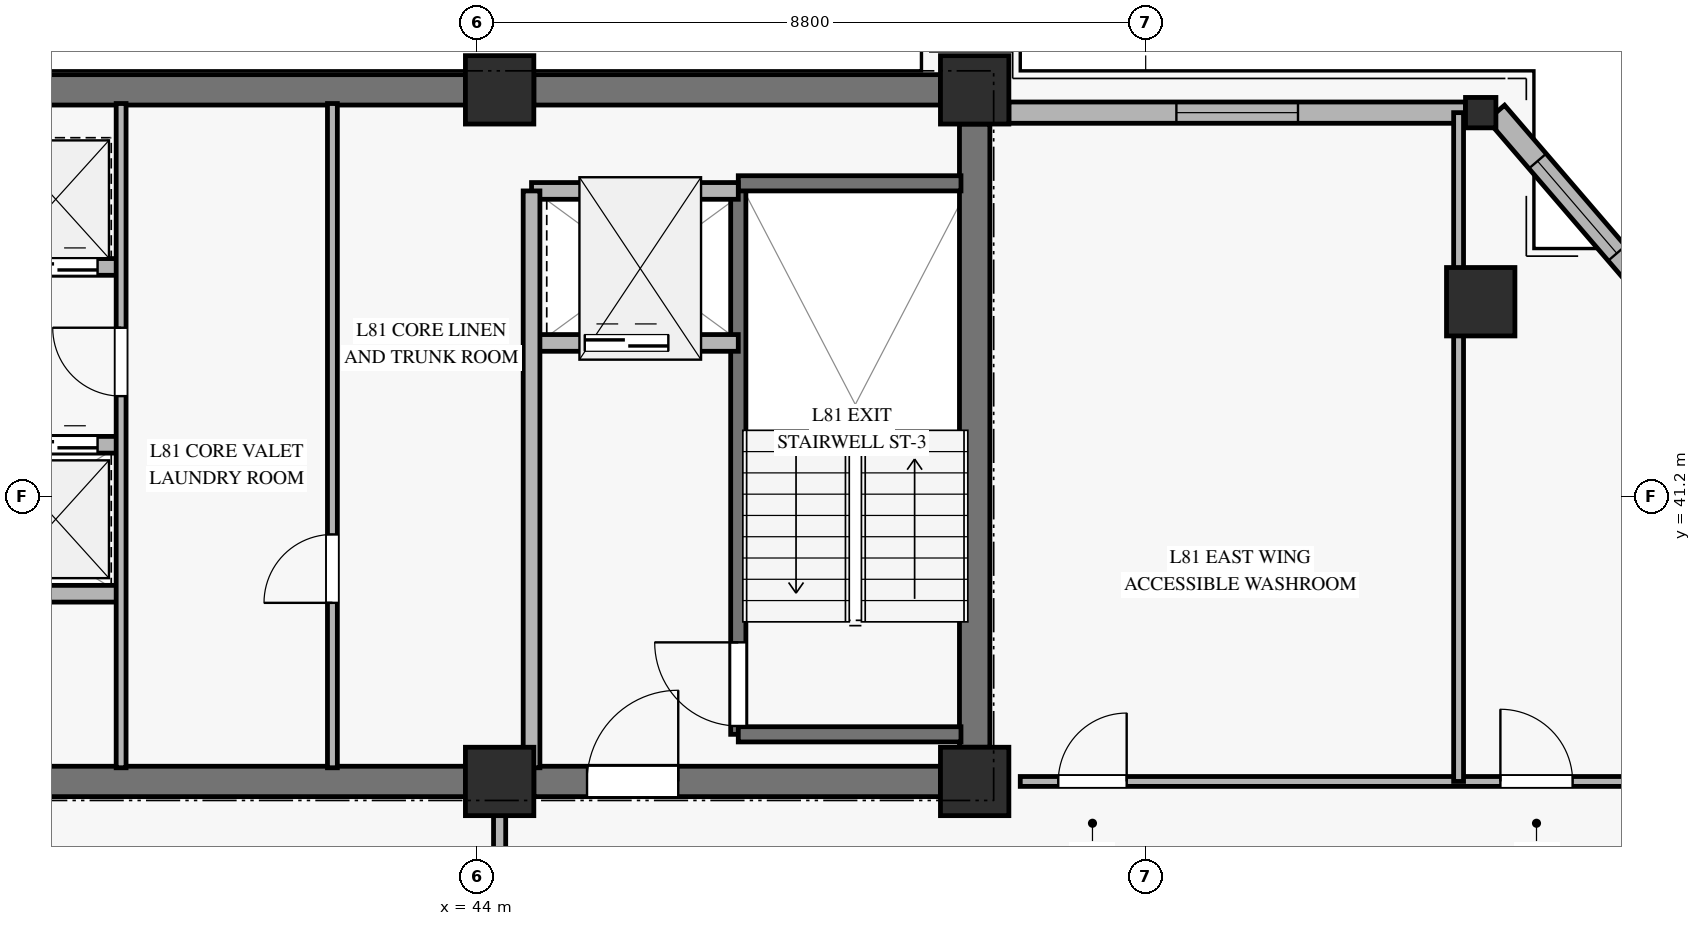
"""IFC4 building model, lengths in metres.
Left out: names, types, materials, properties, quantities, classifications, styles, units other than length and angle.
Written with IfcOpenShell. Run it as: python <this file> out.ifc"""

import sys

from ifc_helpers import new_model, si_unit, direction, frame, frame_2d, origin, origin_2d, place, context, subcontext, project, spatial, rectangle, hollow_rectangle, extrude, source, transform, mapped, element, fill, save


model = new_model("IFC4")
c1 = context("Model", 3, precision=1e-05, world=origin(), true_north=direction((0.0, 1.0)))
c2 = subcontext(c1, "Body", "Model", "MODEL_VIEW")
j1 = project(units=[si_unit("LENGTHUNIT", "METRE"), si_unit("PLANEANGLEUNIT", "RADIAN")], contexts=[c1])
p1 = place(None, origin())
s1 = spatial("IfcSite", under=j1, at=p1, CompositionType="ELEMENT")
p2 = place(p1, origin())
s2 = spatial("IfcBuilding", under=s1, at=p2, CompositionType="ELEMENT")
p3 = place(p2, frame((0.0, 0.0, 314.2)))
s3 = spatial("IfcBuildingStorey", under=s2, at=p3, CompositionType="ELEMENT", Elevation=314.2)
m1 = source(origin(), c2, "Body", "SweptSolid", [
    extrude(rectangle(XDim=0.9, YDim=0.9, at=origin_2d()), origin(), (0.0, 0.0, 1.0), 3.185),
])
for number, where, z_axis, x_axis in (
    (1, (44.3, 37.45, 0.0), (0.0, 0.0, 1.0), (1.0, 0.0, 0.0)),
    (2, (44.3, 46.55, 0.0), (0.0, 0.0, 1.0), (1.0, 0.0, 0.0)),
    (3, (50.55, 37.45, 0.0), (0.0, 0.0, 1.0), (1.0, 0.0, 0.0)),
    (4, (50.55, 46.55, 0.0), (0.0, 0.0, 1.0), (1.0, 0.0, 0.0)),
):
    element("IfcColumn", number, at=place(p3, frame(where, z_axis=z_axis, x_axis=x_axis)), inside=s3, PredefinedType="PILASTER", context=c2, shape_type="MappedRepresentation", body=[
        mapped(m1, transform((0.0, 0.0, 0.0), x_axis=(1.0, 0.0, 0.0), y_axis=(0.0, 1.0, 0.0), z_axis=(0.0, 0.0, 1.0), scale=1.0)),
    ])
p4 = place(p3, frame((36.05, 46.55, 0.0), z_axis=(0.0, 0.0, 1.0), x_axis=(1.0, 0.0, 0.0)))
e5 = element("IfcWall", 5, at=p4, inside=s3, PredefinedType="SHEAR", context=c2, shape_type="SweptSolid", body=[
    extrude(rectangle(XDim=7.8, YDim=0.4, at=frame_2d((3.9, 0.0))), origin(), (0.0, 0.0, 1.0), 3.185),
])
p5 = place(p3, frame((44.75, 46.55, 0.0), z_axis=(0.0, 0.0, 1.0), x_axis=(1.0, 0.0, 0.0)))
e6 = element("IfcWall", 6, at=p5, inside=s3, PredefinedType="SHEAR", context=c2, shape_type="SweptSolid", body=[
    extrude(rectangle(XDim=5.35, YDim=0.4, at=frame_2d((2.675, 0.0))), origin(), (0.0, 0.0, 1.0), 3.185),
])
p6 = place(p3, frame((36.05, 37.45, 0.0), z_axis=(0.0, 0.0, 1.0), x_axis=(1.0, 0.0, 0.0)))
e7 = element("IfcWall", 7, at=p6, inside=s3, PredefinedType="SHEAR", context=c2, shape_type="SweptSolid", body=[
    extrude(rectangle(XDim=7.8, YDim=0.4, at=frame_2d((3.9, 0.0))), origin(), (0.0, 0.0, 1.0), 3.185),
])
p7 = place(p3, frame((44.75, 37.45, 0.0), z_axis=(0.0, 0.0, 1.0), x_axis=(1.0, 0.0, 0.0)))
e8 = element("IfcWall", 8, at=p7, inside=s3, PredefinedType="SHEAR", context=c2, shape_type="SweptSolid", body=[
    extrude(rectangle(XDim=5.35, YDim=0.4, at=frame_2d((2.675, 0.0))), origin(), (0.0, 0.0, 1.0), 3.185),
])
p8 = place(p7, frame((0.7, 0.0, 0.0)))
e9 = element("IfcOpeningElement", 9, at=p8, cuts=e8, PredefinedType="OPENING", context=c2, shape_type="SweptSolid", body=[
    extrude(rectangle(XDim=1.2, YDim=2.15, at=frame_2d((0.6, 1.075))), frame((0.0, 0.21, 0.0), z_axis=(0.0, -1.0, 0.0), x_axis=(1.0, 0.0, 0.0)), (0.0, 0.0, 1.0), 0.42),
])
p9 = place(p3, frame((50.55, 37.9, 0.0), z_axis=(0.0, 0.0, 1.0), x_axis=(0.0, 1.0, 0.0)))
e10 = element("IfcWall", 10, at=p9, inside=s3, PredefinedType="SHEAR", context=c2, shape_type="SweptSolid", body=[
    extrude(rectangle(XDim=8.2, YDim=0.4, at=frame_2d((4.1, 0.0))), origin(), (0.0, 0.0, 1.0), 3.185),
])
m2 = source(origin(), c2, "Body", "SweptSolid", [
    extrude(hollow_rectangle(XDim=0.9, YDim=0.9, WallThickness=0.04, at=origin_2d()), origin(), (0.0, 0.0, 1.0), 3.185),
])
p10 = place(p3, frame((57.208, 43.762, 0.0), z_axis=(0.0, 0.0, 1.0), x_axis=(1.0, 0.0, 0.0)))
e11 = element("IfcColumn", 11, at=p10, inside=s3, PredefinedType="COLUMN", context=c2, shape_type="MappedRepresentation", body=[
    mapped(m2, transform((0.0, 0.0, 0.0), x_axis=(1.0, 0.0, 0.0), y_axis=(0.0, 1.0, 0.0), z_axis=(0.0, 0.0, 1.0), scale=1.0)),
])
m3 = source(origin(), c2, "Body", "SweptSolid", [
    extrude(hollow_rectangle(XDim=0.4, YDim=0.4, WallThickness=0.02, at=origin_2d()), origin(), (0.0, 0.0, 1.0), 3.185),
])
p11 = place(p3, frame((57.208, 46.25, 0.0), z_axis=(0.0, 0.0, 1.0), x_axis=(1.0, 0.0, 0.0)))
e12 = element("IfcColumn", 12, at=p11, inside=s3, PredefinedType="COLUMN", context=c2, shape_type="MappedRepresentation", body=[
    mapped(m3, transform((0.0, 0.0, 0.0), x_axis=(1.0, 0.0, 0.0), y_axis=(0.0, 1.0, 0.0), z_axis=(0.0, 0.0, 1.0), scale=1.0)),
])
p12 = place(p3, frame((51.0, 46.25, 0.0), z_axis=(0.0, 0.0, 1.0), x_axis=(1.0, 0.0, 0.0)))
e13 = element("IfcWall", 13, at=p12, inside=s3, PredefinedType="SOLIDWALL", context=c2, shape_type="SweptSolid", body=[
    extrude(rectangle(XDim=6.008, YDim=0.28, at=frame_2d((3.004, 0.0))), origin(), (0.0, 0.0, 1.0), 2.815),
])
p13 = place(p12, frame((2.204, 0.0, 0.45)))
e14 = element("IfcOpeningElement", 14, at=p13, cuts=e13, PredefinedType="OPENING", context=c2, shape_type="SweptSolid", body=[
    extrude(rectangle(XDim=1.6, YDim=2.0, at=frame_2d((0.8, 1.0))), frame((0.0, 0.15, 0.0), z_axis=(0.0, -1.0, 0.0), x_axis=(1.0, 0.0, 0.0)), (0.0, 0.0, 1.0), 0.3),
])
p14 = place(p3, frame((59.546, 43.762, 0.0), z_axis=(0.0, 0.0, 1.0), x_axis=(-0.65172861611, 0.758452246977, 0.0)))
e15 = element("IfcWall", 15, at=p14, inside=s3, PredefinedType="SOLIDWALL", context=c2, shape_type="SweptSolid", body=[
    extrude(rectangle(XDim=3.281, YDim=0.3, at=frame_2d((1.64, 0.0))), origin(), (0.0, 0.0, 1.0), 2.815),
])
p15 = place(p14, frame((0.84, 0.0, 0.45)))
e16 = element("IfcOpeningElement", 16, at=p15, cuts=e15, PredefinedType="OPENING", context=c2, shape_type="SweptSolid", body=[
    extrude(rectangle(XDim=1.6, YDim=2.0, at=frame_2d((0.8, 1.0))), frame((0.0, 0.16, 0.0), z_axis=(0.0, -1.0, 0.0), x_axis=(1.0, 0.0, 0.0)), (0.0, 0.0, 1.0), 0.32),
])
p16 = place(p3, frame((47.44, 38.07, 0.0), z_axis=(0.0, 0.0, 1.0), x_axis=(0.0, 1.0, 0.0)))
e17 = element("IfcWall", 17, at=p16, inside=s3, PredefinedType="SOLIDWALL", context=c2, shape_type="SweptSolid", body=[
    extrude(rectangle(XDim=7.25, YDim=0.2, at=frame_2d((3.625, 0.0))), origin(), (0.0, 0.0, 1.0), 3.4),
])
p17 = place(p16, frame((0.11, 0.0, 0.0)))
e18 = element("IfcOpeningElement", 18, at=p17, cuts=e17, PredefinedType="OPENING", context=c2, shape_type="SweptSolid", body=[
    extrude(rectangle(XDim=1.1, YDim=2.15, at=frame_2d((0.55, 1.075))), frame((0.0, 0.11, 0.0), z_axis=(0.0, -1.0, 0.0), x_axis=(1.0, 0.0, 0.0)), (0.0, 0.0, 1.0), 0.22),
])
for number, where, z_axis, x_axis in (
    (19, (47.44, 45.32, 0.0), (0.0, 0.0, 1.0), (1.0, 0.0, 0.0)),
    (20, (47.44, 38.07, 0.0), (0.0, 0.0, 1.0), (1.0, 0.0, 0.0)),
):
    element("IfcWall", number, at=place(p3, frame(where, z_axis=z_axis, x_axis=x_axis)), inside=s3, PredefinedType="SOLIDWALL", context=c2, shape_type="SweptSolid", body=[
        extrude(rectangle(XDim=2.93, YDim=0.2, at=frame_2d((1.465, 0.0))), origin(), (0.0, 0.0, 1.0), 3.4),
    ])
p18 = place(p3, frame((44.72, 43.22, 0.0), z_axis=(0.0, 0.0, 1.0), x_axis=(1.0, 0.0, 0.0)))
e21 = element("IfcWall", 21, at=p18, inside=s3, PredefinedType="SOLIDWALL", context=c2, shape_type="SweptSolid", body=[
    extrude(rectangle(XDim=2.72, YDim=0.22, at=frame_2d((1.36, 0.0))), origin(), (0.0, 0.0, 1.0), 3.185),
])
p19 = place(p18, frame((0.7, 0.0, 0.0)))
e22 = element("IfcOpeningElement", 22, at=p19, cuts=e21, PredefinedType="OPENING", context=c2, shape_type="SweptSolid", body=[
    extrude(rectangle(XDim=1.1, YDim=2.2, at=frame_2d((0.55, 1.1))), frame((0.0, 0.12, 0.0), z_axis=(0.0, -1.0, 0.0), x_axis=(1.0, 0.0, 0.0)), (0.0, 0.0, 1.0), 0.24),
])
p20 = place(p3, frame((44.72, 45.22, 0.0), z_axis=(0.0, 0.0, 1.0), x_axis=(1.0, 0.0, 0.0)))
e23 = element("IfcWall", 23, at=p20, inside=s3, PredefinedType="SOLIDWALL", context=c2, shape_type="SweptSolid", body=[
    extrude(rectangle(XDim=2.72, YDim=0.22, at=frame_2d((1.36, 0.0))), origin(), (0.0, 0.0, 1.0), 3.185),
])
p21 = place(p3, frame((44.72, 37.63, 0.0), z_axis=(0.0, 0.0, 1.0), x_axis=(0.0, 1.0, 0.0)))
e24 = element("IfcWall", 24, at=p21, inside=s3, PredefinedType="SOLIDWALL", context=c2, shape_type="SweptSolid", body=[
    extrude(rectangle(XDim=7.59, YDim=0.22, at=frame_2d((3.795, 0.0))), origin(), (0.0, 0.0, 1.0), 3.185),
])
p22 = place(p3, frame((36.12, 44.22, 0.0), z_axis=(0.0, 0.0, 1.0), x_axis=(1.0, 0.0, 0.0)))
e25 = element("IfcWall", 25, at=p22, inside=s3, PredefinedType="SOLIDWALL", context=c2, shape_type="SweptSolid", body=[
    extrude(rectangle(XDim=3.2, YDim=0.22, at=frame_2d((1.6, 0.0))), origin(), (0.0, 0.0, 1.0), 3.185),
])
p23 = place(p22, frame((0.3, 0.0, 0.0)))
e26 = element("IfcOpeningElement", 26, at=p23, cuts=e25, PredefinedType="OPENING", context=c2, shape_type="SweptSolid", body=[
    extrude(rectangle(XDim=1.1, YDim=2.2, at=frame_2d((0.55, 1.1))), frame((0.0, 0.12, 0.0), z_axis=(0.0, -1.0, 0.0), x_axis=(1.0, 0.0, 0.0)), (0.0, 0.0, 1.0), 0.24),
])
p24 = place(p22, frame((1.79, 0.0, 0.0)))
e27 = element("IfcOpeningElement", 27, at=p24, cuts=e25, PredefinedType="OPENING", context=c2, shape_type="SweptSolid", body=[
    extrude(rectangle(XDim=1.1, YDim=2.2, at=frame_2d((0.55, 1.1))), frame((0.0, 0.12, 0.0), z_axis=(0.0, -1.0, 0.0), x_axis=(1.0, 0.0, 0.0)), (0.0, 0.0, 1.0), 0.24),
])
p25 = place(p3, frame((36.12, 41.88, 0.0), z_axis=(0.0, 0.0, 1.0), x_axis=(1.0, 0.0, 0.0)))
e28 = element("IfcWall", 28, at=p25, inside=s3, PredefinedType="SOLIDWALL", context=c2, shape_type="SweptSolid", body=[
    extrude(rectangle(XDim=3.2, YDim=0.22, at=frame_2d((1.6, 0.0))), origin(), (0.0, 0.0, 1.0), 3.185),
])
p26 = place(p25, frame((0.3, 0.0, 0.0)))
e29 = element("IfcOpeningElement", 29, at=p26, cuts=e28, PredefinedType="OPENING", context=c2, shape_type="SweptSolid", body=[
    extrude(rectangle(XDim=1.1, YDim=2.2, at=frame_2d((0.55, 1.1))), frame((0.0, 0.12, 0.0), z_axis=(0.0, -1.0, 0.0), x_axis=(1.0, 0.0, 0.0)), (0.0, 0.0, 1.0), 0.24),
])
p27 = place(p25, frame((1.79, 0.0, 0.0)))
e30 = element("IfcOpeningElement", 30, at=p27, cuts=e28, PredefinedType="OPENING", context=c2, shape_type="SweptSolid", body=[
    extrude(rectangle(XDim=1.1, YDim=2.2, at=frame_2d((0.55, 1.1))), frame((0.0, 0.12, 0.0), z_axis=(0.0, -1.0, 0.0), x_axis=(1.0, 0.0, 0.0)), (0.0, 0.0, 1.0), 0.24),
])
p28 = place(p3, frame((36.12, 39.92, 0.0), z_axis=(0.0, 0.0, 1.0), x_axis=(1.0, 0.0, 0.0)))
e31 = element("IfcWall", 31, at=p28, inside=s3, PredefinedType="SOLIDWALL", context=c2, shape_type="SweptSolid", body=[
    extrude(rectangle(XDim=3.2, YDim=0.22, at=frame_2d((1.6, 0.0))), origin(), (0.0, 0.0, 1.0), 3.185),
])
p29 = place(p3, frame((39.32, 37.63, 0.0), z_axis=(0.0, 0.0, 1.0), x_axis=(0.0, 1.0, 0.0)))
e32 = element("IfcWall", 32, at=p29, inside=s3, PredefinedType="PARTITIONING", context=c2, shape_type="SweptSolid", body=[
    extrude(rectangle(XDim=8.74, YDim=0.13, at=frame_2d((4.37, 0.0))), origin(), (0.0, 0.0, 1.0), 3.185),
])
p30 = place(p29, frame((4.89, 0.0, 0.0)))
e33 = element("IfcOpeningElement", 33, at=p30, cuts=e32, PredefinedType="OPENING", context=c2, shape_type="SweptSolid", body=[
    extrude(rectangle(XDim=0.9, YDim=2.1, at=frame_2d((0.45, 1.05))), frame((0.0, 0.075, 0.0), z_axis=(0.0, -1.0, 0.0), x_axis=(1.0, 0.0, 0.0)), (0.0, 0.0, 1.0), 0.15),
])
p31 = place(p3, frame((42.1, 37.63, 0.0), z_axis=(0.0, 0.0, 1.0), x_axis=(0.0, 1.0, 0.0)))
e34 = element("IfcWall", 34, at=p31, inside=s3, PredefinedType="PARTITIONING", context=c2, shape_type="SweptSolid", body=[
    extrude(rectangle(XDim=8.74, YDim=0.13, at=frame_2d((4.37, 0.0))), origin(), (0.0, 0.0, 1.0), 3.185),
])
p32 = place(p31, frame((2.17, 0.0, 0.0)))
e35 = element("IfcOpeningElement", 35, at=p32, cuts=e34, PredefinedType="OPENING", context=c2, shape_type="SweptSolid", body=[
    extrude(rectangle(XDim=0.9, YDim=2.1, at=frame_2d((0.45, 1.05))), frame((0.0, 0.075, 0.0), z_axis=(0.0, -1.0, 0.0), x_axis=(1.0, 0.0, 0.0)), (0.0, 0.0, 1.0), 0.15),
])
p33 = place(p3, frame((44.3, 20.704, 0.0), z_axis=(0.0, 0.0, 1.0), x_axis=(0.0, 1.0, 0.0)))
e36 = element("IfcWall", 36, at=p33, inside=s3, PredefinedType="PARTITIONING", context=c2, shape_type="SweptSolid", body=[
    extrude(rectangle(XDim=16.746, YDim=0.16, at=frame_2d((8.373, 0.0))), origin(), (0.0, 0.0, 1.0), 2.47),
])
p34 = place(p33, frame((13.766, 0.0, 0.0)))
e37 = element("IfcOpeningElement", 37, at=p34, cuts=e36, PredefinedType="OPENING", context=c2, shape_type="SweptSolid", body=[
    extrude(rectangle(XDim=1.05, YDim=2.15, at=frame_2d((0.525, 1.075))), frame((0.0, 0.09, 0.0), z_axis=(0.0, -1.0, 0.0), x_axis=(1.0, 0.0, 0.0)), (0.0, 0.0, 1.0), 0.18),
])
p35 = place(p3, frame((51.15, 37.45, 0.0), z_axis=(0.0, 0.0, 1.0), x_axis=(1.0, 0.0, 0.0)))
e38 = element("IfcWall", 38, at=p35, inside=s3, PredefinedType="PARTITIONING", context=c2, shape_type="SweptSolid", body=[
    extrude(rectangle(XDim=8.396, YDim=0.13, at=frame_2d((4.198, 0.0))), origin(), (0.0, 0.0, 1.0), 2.82),
])
p36 = place(p35, frame((0.5, 0.0, 0.0)))
e39 = element("IfcOpeningElement", 39, at=p36, cuts=e38, PredefinedType="OPENING", context=c2, shape_type="SweptSolid", body=[
    extrude(rectangle(XDim=0.9, YDim=2.1, at=frame_2d((0.45, 1.05))), frame((0.0, 0.075, 0.0), z_axis=(0.0, -1.0, 0.0), x_axis=(1.0, 0.0, 0.0)), (0.0, 0.0, 1.0), 0.15),
])
p37 = place(p35, frame((6.317, 0.0, 0.0)))
e40 = element("IfcOpeningElement", 40, at=p37, cuts=e38, PredefinedType="OPENING", context=c2, shape_type="SweptSolid", body=[
    extrude(rectangle(XDim=0.95, YDim=2.1, at=frame_2d((0.475, 1.05))), frame((0.0, 0.075, 0.0), z_axis=(0.0, -1.0, 0.0), x_axis=(1.0, 0.0, 0.0)), (0.0, 0.0, 1.0), 0.15),
])
p38 = place(p3, frame((56.917, 37.45, 0.0), z_axis=(0.0, 0.0, 1.0), x_axis=(0.0, 1.0, 0.0)))
e41 = element("IfcWall", 41, at=p38, inside=s3, PredefinedType="PARTITIONING", context=c2, shape_type="SweptSolid", body=[
    extrude(rectangle(XDim=8.8, YDim=0.13, at=frame_2d((4.4, 0.0))), origin(), (0.0, 0.0, 1.0), 2.82),
])
m4 = source(origin(), c2, "Body", "SweptSolid", [
    extrude(rectangle(XDim=1.6, YDim=2.0, at=frame_2d((0.8, 1.0))), frame((0.0, 0.03, 0.0), z_axis=(0.0, -1.0, 0.0), x_axis=(1.0, 0.0, 0.0)), (0.0, 0.0, 1.0), 0.06),
])
p39 = place(p13, origin())
e42 = element("IfcWindow", 42, at=p39, inside=s3, PartitioningType="SINGLE_PANEL", PredefinedType="WINDOW", context=c2, shape_type="MappedRepresentation", body=[
    mapped(m4, transform((0.0, 0.0, 0.0), x_axis=(1.0, 0.0, 0.0), y_axis=(0.0, 1.0, 0.0), z_axis=(0.0, 0.0, 1.0), scale=1.0)),
])
fill(e14, e42)
p40 = place(p15, origin())
e43 = element("IfcWindow", 43, at=p40, inside=s3, PartitioningType="SINGLE_PANEL", PredefinedType="WINDOW", context=c2, shape_type="MappedRepresentation", body=[
    mapped(m4, transform((0.0, 0.0, 0.0), x_axis=(1.0, 0.0, 0.0), y_axis=(0.0, 1.0, 0.0), z_axis=(0.0, 0.0, 1.0), scale=1.0)),
])
fill(e16, e43)
m5 = source(origin(), c2, "Body", "SweptSolid", [
    extrude(rectangle(XDim=1.1, YDim=2.15, at=frame_2d((0.55, 1.075))), frame((0.0, 0.025, 0.0), z_axis=(0.0, -1.0, 0.0), x_axis=(1.0, 0.0, 0.0)), (0.0, 0.0, 1.0), 0.05),
])
p41 = place(p17, origin())
e44 = element("IfcDoor", 44, at=p41, inside=s3, OperationType="SINGLE_SWING_RIGHT", PredefinedType="DOOR", context=c2, shape_type="MappedRepresentation", body=[
    mapped(m5, transform((0.0, 0.0, 0.0), x_axis=(1.0, 0.0, 0.0), y_axis=(0.0, 1.0, 0.0), z_axis=(0.0, 0.0, 1.0), scale=1.0)),
])
fill(e18, e44)
m6 = source(origin(), c2, "Body", "SweptSolid", [
    extrude(rectangle(XDim=1.1, YDim=2.2, at=frame_2d((0.55, 1.1))), frame((0.0, 0.025, 0.0), z_axis=(0.0, -1.0, 0.0), x_axis=(1.0, 0.0, 0.0)), (0.0, 0.0, 1.0), 0.05),
])
p42 = place(p19, origin())
e45 = element("IfcDoor", 45, at=p42, inside=s3, OperationType="SLIDING_TO_LEFT", PredefinedType="DOOR", context=c2, shape_type="MappedRepresentation", body=[
    mapped(m6, transform((0.0, 0.0, 0.0), x_axis=(1.0, 0.0, 0.0), y_axis=(0.0, 1.0, 0.0), z_axis=(0.0, 0.0, 1.0), scale=1.0)),
])
fill(e22, e45)
m7 = source(origin(), c2, "Body", "SweptSolid", [
    extrude(rectangle(XDim=1.2, YDim=2.15, at=frame_2d((0.6, 1.075))), frame((0.0, 0.025, 0.0), z_axis=(0.0, -1.0, 0.0), x_axis=(1.0, 0.0, 0.0)), (0.0, 0.0, 1.0), 0.05),
])
p43 = place(p8, origin())
e46 = element("IfcDoor", 46, at=p43, inside=s3, OperationType="SINGLE_SWING_RIGHT", PredefinedType="DOOR", context=c2, shape_type="MappedRepresentation", body=[
    mapped(m7, transform((0.0, 0.0, 0.0), x_axis=(1.0, 0.0, 0.0), y_axis=(0.0, 1.0, 0.0), z_axis=(0.0, 0.0, 1.0), scale=1.0)),
])
fill(e9, e46)
p44 = place(p24, origin())
e47 = element("IfcDoor", 47, at=p44, inside=s3, OperationType="SLIDING_TO_LEFT", PredefinedType="DOOR", context=c2, shape_type="MappedRepresentation", body=[
    mapped(m6, transform((0.0, 0.0, 0.0), x_axis=(1.0, 0.0, 0.0), y_axis=(0.0, 1.0, 0.0), z_axis=(0.0, 0.0, 1.0), scale=1.0)),
])
fill(e27, e47)
p45 = place(p27, origin())
e48 = element("IfcDoor", 48, at=p45, inside=s3, OperationType="SLIDING_TO_LEFT", PredefinedType="DOOR", context=c2, shape_type="MappedRepresentation", body=[
    mapped(m6, transform((0.0, 0.0, 0.0), x_axis=(1.0, 0.0, 0.0), y_axis=(0.0, 1.0, 0.0), z_axis=(0.0, 0.0, 1.0), scale=1.0)),
])
fill(e30, e48)
m8 = source(origin(), c2, "Body", "SweptSolid", [
    extrude(rectangle(XDim=0.9, YDim=2.1, at=frame_2d((0.45, 1.05))), frame((0.0, 0.025, 0.0), z_axis=(0.0, -1.0, 0.0), x_axis=(1.0, 0.0, 0.0)), (0.0, 0.0, 1.0), 0.05),
])
p46 = place(p30, origin())
e49 = element("IfcDoor", 49, at=p46, inside=s3, OperationType="SINGLE_SWING_RIGHT", PredefinedType="DOOR", context=c2, shape_type="MappedRepresentation", body=[
    mapped(m8, transform((0.0, 0.0, 0.0), x_axis=(1.0, 0.0, 0.0), y_axis=(0.0, 1.0, 0.0), z_axis=(0.0, 0.0, 1.0), scale=1.0)),
])
fill(e33, e49)
p47 = place(p32, origin())
e50 = element("IfcDoor", 50, at=p47, inside=s3, OperationType="SINGLE_SWING_LEFT", PredefinedType="DOOR", context=c2, shape_type="MappedRepresentation", body=[
    mapped(m8, transform((0.0, 0.0, 0.0), x_axis=(1.0, 0.0, 0.0), y_axis=(0.0, 1.0, 0.0), z_axis=(0.0, 0.0, 1.0), scale=1.0)),
])
fill(e35, e50)
p48 = place(p36, origin())
e51 = element("IfcDoor", 51, at=p48, inside=s3, OperationType="SINGLE_SWING_RIGHT", PredefinedType="DOOR", context=c2, shape_type="MappedRepresentation", body=[
    mapped(m8, transform((0.0, 0.0, 0.0), x_axis=(1.0, 0.0, 0.0), y_axis=(0.0, 1.0, 0.0), z_axis=(0.0, 0.0, 1.0), scale=1.0)),
])
fill(e39, e51)
m9 = source(origin(), c2, "Body", "SweptSolid", [
    extrude(rectangle(XDim=0.95, YDim=2.1, at=frame_2d((0.475, 1.05))), frame((0.0, 0.025, 0.0), z_axis=(0.0, -1.0, 0.0), x_axis=(1.0, 0.0, 0.0)), (0.0, 0.0, 1.0), 0.05),
])
p49 = place(p37, origin())
e52 = element("IfcDoor", 52, at=p49, inside=s3, OperationType="SINGLE_SWING_LEFT", PredefinedType="DOOR", context=c2, shape_type="MappedRepresentation", body=[
    mapped(m9, transform((0.0, 0.0, 0.0), x_axis=(1.0, 0.0, 0.0), y_axis=(0.0, 1.0, 0.0), z_axis=(0.0, 0.0, 1.0), scale=1.0)),
])
fill(e40, e52)
save(model, sys.argv[1])
